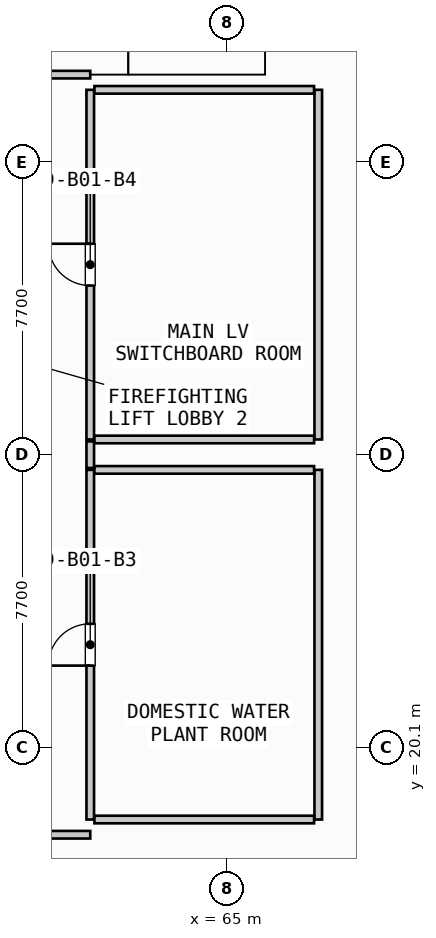
"""IFC4 building model, lengths in metres.
Left out: names, types, materials, properties, quantities, classifications, styles, units other than length and angle.
Written with IfcOpenShell. Run it as: python <this file> out.ifc"""

import sys

from ifc_helpers import new_model, si_unit, direction, frame, frame_2d, origin, place, context, subcontext, project, spatial, rectangle, extrude, source, transform, mapped, element, fill, save


model = new_model("IFC4")
c1 = context("Model", 3, precision=1e-05, world=origin(), true_north=direction((0.0, 1.0)))
c2 = subcontext(c1, "Body", "Model", "MODEL_VIEW")
j1 = project(units=[si_unit("LENGTHUNIT", "METRE"), si_unit("PLANEANGLEUNIT", "RADIAN")], contexts=[c1])
p1 = place(None, origin())
s1 = spatial("IfcSite", under=j1, at=p1, CompositionType="ELEMENT")
p2 = place(p1, origin())
s2 = spatial("IfcBuilding", under=s1, at=p2, CompositionType="ELEMENT")
p3 = place(p2, frame((0.0, 0.0, -4.5)))
s3 = spatial("IfcBuildingStorey", under=s2, at=p3, CompositionType="ELEMENT", Elevation=-4.5)
p4 = place(p3, frame((61.4, 18.2, 0.0), z_axis=(0.0, 0.0, 1.0), x_axis=(0.0, 1.0, 0.0)))
e1 = element("IfcWall", 1, at=p4, inside=s3, PredefinedType="PARTITIONING", context=c2, shape_type="SweptSolid", body=[
    extrude(rectangle(XDim=9.2, YDim=0.2, at=frame_2d((4.6, 0.0))), origin(), (0.0, 0.0, 1.0), 3.463),
])
p5 = place(p4, frame((4.05, 0.0, 0.0)))
e2 = element("IfcOpeningElement", 2, at=p5, cuts=e1, PredefinedType="OPENING", context=c2, shape_type="SweptSolid", body=[
    extrude(rectangle(XDim=1.1, YDim=2.15, at=frame_2d((0.55, 1.075))), frame((0.0, 0.11, 0.0), z_axis=(0.0, -1.0, 0.0), x_axis=(1.0, 0.0, 0.0)), (0.0, 0.0, 1.0), 0.22),
])
p6 = place(p3, frame((67.4, 18.2, 0.0), z_axis=(0.0, 0.0, 1.0), x_axis=(0.0, 1.0, 0.0)))
e3 = element("IfcWall", 3, at=p6, inside=s3, PredefinedType="PARTITIONING", context=c2, shape_type="SweptSolid", body=[
    extrude(rectangle(XDim=9.2, YDim=0.2, at=frame_2d((4.6, 0.0))), origin(), (0.0, 0.0, 1.0), 3.463),
])
for number, where, z_axis, x_axis in (
    (4, (61.51, 18.2, 0.0), (0.0, 0.0, 1.0), (1.0, 0.0, 0.0)),
    (5, (61.51, 27.4, 0.0), (0.0, 0.0, 1.0), (1.0, 0.0, 0.0)),
):
    element("IfcWall", number, at=place(p3, frame(where, z_axis=z_axis, x_axis=x_axis)), inside=s3, PredefinedType="PARTITIONING", context=c2, shape_type="SweptSolid", body=[
        extrude(rectangle(XDim=5.78, YDim=0.2, at=frame_2d((2.89, 0.0))), origin(), (0.0, 0.0, 1.0), 3.463),
    ])
p7 = place(p3, frame((61.4, 28.2, 0.0), z_axis=(0.0, 0.0, 1.0), x_axis=(0.0, 1.0, 0.0)))
e6 = element("IfcWall", 6, at=p7, inside=s3, PredefinedType="PARTITIONING", context=c2, shape_type="SweptSolid", body=[
    extrude(rectangle(XDim=9.2, YDim=0.2, at=frame_2d((4.6, 0.0))), origin(), (0.0, 0.0, 1.0), 3.463),
])
p8 = place(p7, frame((4.05, 0.0, 0.0)))
e7 = element("IfcOpeningElement", 7, at=p8, cuts=e6, PredefinedType="OPENING", context=c2, shape_type="SweptSolid", body=[
    extrude(rectangle(XDim=1.1, YDim=2.15, at=frame_2d((0.55, 1.075))), frame((0.0, 0.11, 0.0), z_axis=(0.0, -1.0, 0.0), x_axis=(1.0, 0.0, 0.0)), (0.0, 0.0, 1.0), 0.22),
])
p9 = place(p3, frame((67.4, 28.2, 0.0), z_axis=(0.0, 0.0, 1.0), x_axis=(0.0, 1.0, 0.0)))
e8 = element("IfcWall", 8, at=p9, inside=s3, PredefinedType="PARTITIONING", context=c2, shape_type="SweptSolid", body=[
    extrude(rectangle(XDim=9.2, YDim=0.2, at=frame_2d((4.6, 0.0))), origin(), (0.0, 0.0, 1.0), 3.463),
])
for number, where, z_axis, x_axis in (
    (9, (61.51, 28.2, 0.0), (0.0, 0.0, 1.0), (1.0, 0.0, 0.0)),
    (10, (61.51, 37.4, 0.0), (0.0, 0.0, 1.0), (1.0, 0.0, 0.0)),
):
    element("IfcWall", number, at=place(p3, frame(where, z_axis=z_axis, x_axis=x_axis)), inside=s3, PredefinedType="PARTITIONING", context=c2, shape_type="SweptSolid", body=[
        extrude(rectangle(XDim=5.78, YDim=0.2, at=frame_2d((2.89, 0.0))), origin(), (0.0, 0.0, 1.0), 3.463),
    ])
p10 = place(p3, frame((61.4, 27.45, 0.0), z_axis=(0.0, 0.0, 1.0), x_axis=(0.0, 1.0, 0.0)))
e11 = element("IfcWall", 11, at=p10, inside=s3, PredefinedType="PARTITIONING", context=c2, shape_type="SweptSolid", body=[
    extrude(rectangle(XDim=0.7, YDim=0.2, at=frame_2d((0.35, 0.0))), origin(), (0.0, 0.0, 1.0), 3.463),
])
p11 = place(p3, frame((32.2, 17.8, 0.0), z_axis=(0.0, 0.0, 1.0), x_axis=(1.0, 0.0, 0.0)))
e12 = element("IfcWall", 12, at=p11, inside=s3, PredefinedType="PARTITIONING", context=c2, shape_type="SweptSolid", body=[
    extrude(rectangle(XDim=29.2, YDim=0.2, at=frame_2d((14.6, 0.0))), origin(), (0.0, 0.0, 1.0), 3.463),
])
p12 = place(p11, frame((13.85, 0.0, 0.0)))
e13 = element("IfcOpeningElement", 13, at=p12, cuts=e12, PredefinedType="OPENING", context=c2, shape_type="SweptSolid", body=[
    extrude(rectangle(XDim=1.5, YDim=2.2, at=frame_2d((0.75, 1.1))), frame((0.0, 0.11, 0.0), z_axis=(0.0, -1.0, 0.0), x_axis=(1.0, 0.0, 0.0)), (0.0, 0.0, 1.0), 0.22),
])
p13 = place(p3, frame((32.2, 37.8, 0.0), z_axis=(0.0, 0.0, 1.0), x_axis=(1.0, 0.0, 0.0)))
e14 = element("IfcWall", 14, at=p13, inside=s3, PredefinedType="PARTITIONING", context=c2, shape_type="SweptSolid", body=[
    extrude(rectangle(XDim=29.2, YDim=0.2, at=frame_2d((14.6, 0.0))), origin(), (0.0, 0.0, 1.0), 3.463),
])
p14 = place(p13, frame((13.85, 0.0, 0.0)))
e15 = element("IfcOpeningElement", 15, at=p14, cuts=e14, PredefinedType="OPENING", context=c2, shape_type="SweptSolid", body=[
    extrude(rectangle(XDim=1.5, YDim=2.2, at=frame_2d((0.75, 1.1))), frame((0.0, 0.11, 0.0), z_axis=(0.0, -1.0, 0.0), x_axis=(1.0, 0.0, 0.0)), (0.0, 0.0, 1.0), 0.22),
])
m1 = source(origin(), c2, "Body", "SweptSolid", [
    extrude(rectangle(XDim=1.1, YDim=2.15, at=frame_2d((0.55, 1.075))), frame((0.0, 0.025, 0.0), z_axis=(0.0, -1.0, 0.0), x_axis=(1.0, 0.0, 0.0)), (0.0, 0.0, 1.0), 0.05),
])
p15 = place(p5, origin())
e16 = element("IfcDoor", 16, at=p15, inside=s3, OperationType="SINGLE_SWING_LEFT", PredefinedType="DOOR", context=c2, shape_type="MappedRepresentation", body=[
    mapped(m1, transform((0.0, 0.0, 0.0), scale=1.0)),
])
fill(e2, e16)
p16 = place(p8, origin())
e17 = element("IfcDoor", 17, at=p16, inside=s3, OperationType="SINGLE_SWING_RIGHT", PredefinedType="DOOR", context=c2, shape_type="MappedRepresentation", body=[
    mapped(m1, transform((0.0, 0.0, 0.0), scale=1.0)),
])
fill(e7, e17)
save(model, sys.argv[1])
